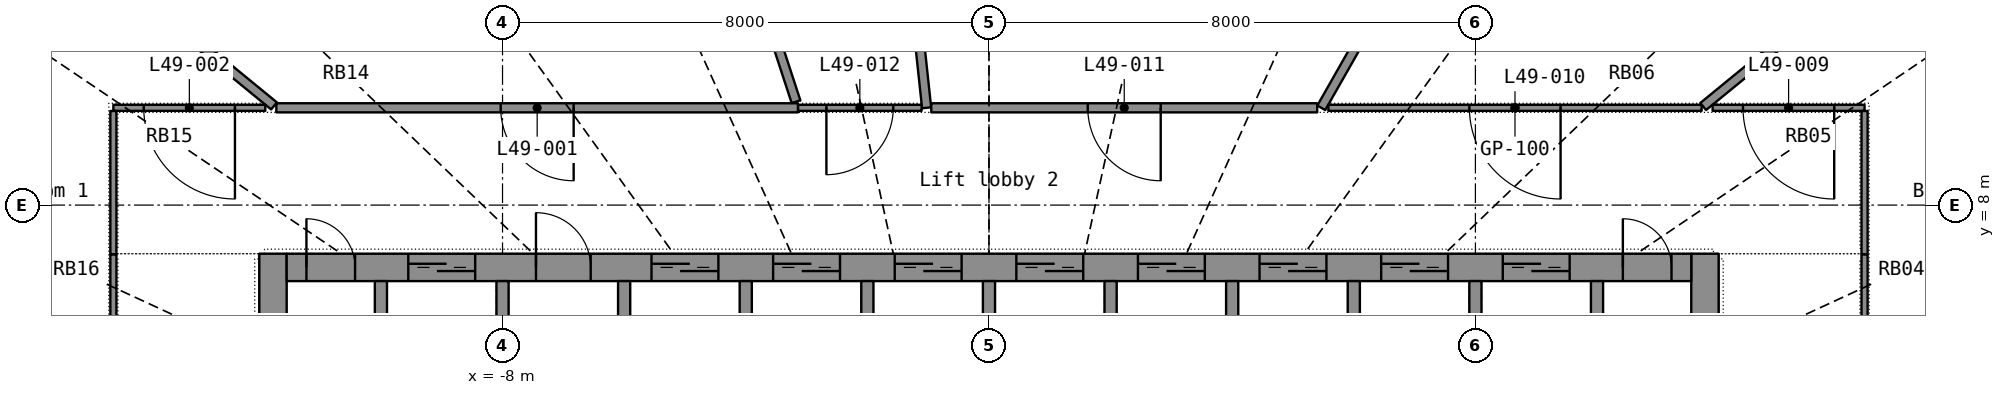
"""IFC4 building model, lengths in metres.
Left out: names, types, materials, properties, quantities, classifications, styles, units other than length and angle.
Written with IfcOpenShell. Run it as: python <this file> out.ifc"""

import sys

from ifc_helpers import new_model, si_unit, direction, frame, frame_2d, origin, place, context, subcontext, project, spatial, rectangle, extrude, element, fill, save


model = new_model("IFC4")
c1 = context("Model", 3, precision=1e-05, world=origin(), true_north=direction((0.0, 1.0)))
c2 = subcontext(c1, "Body", "Model", "MODEL_VIEW")
j1 = project(units=[si_unit("LENGTHUNIT", "METRE"), si_unit("PLANEANGLEUNIT", "RADIAN")], contexts=[c1])
p1 = place(None, origin())
s1 = spatial("IfcSite", under=j1, at=p1, CompositionType="ELEMENT")
p2 = place(p1, origin())
s2 = spatial("IfcBuilding", under=s1, at=p2, CompositionType="ELEMENT")
p3 = place(p2, frame((0.0, 0.0, 201.5)))
s3 = spatial("IfcBuildingStorey", under=s2, at=p3, CompositionType="ELEMENT", Elevation=201.5)
p4 = place(p3, frame((-11.775, -7.2, 0.0), z_axis=(0.0, 0.0, 1.0), x_axis=(0.0, 1.0, 0.0)))
e1 = element("IfcWall", 1, at=p4, inside=s3, PredefinedType="SHEAR", context=c2, shape_type="SweptSolid", body=[
    extrude(rectangle(XDim=14.4, YDim=0.45, at=frame_2d((7.2, 0.0))), origin(), (0.0, 0.0, 1.0), 3.3),
])
p5 = place(p4, frame((6.5, 0.0, 0.0)))
e2 = element("IfcOpeningElement", 2, at=p5, cuts=e1, PredefinedType="OPENING", context=c2, shape_type="SweptSolid", body=[
    extrude(rectangle(XDim=1.4, YDim=2.2, at=frame_2d((0.7, 1.1))), frame((0.0, 0.235, 0.0), z_axis=(0.0, -1.0, 0.0), x_axis=(1.0, 0.0, 0.0)), (0.0, 0.0, 1.0), 0.47),
])
p6 = place(p3, frame((11.775, -7.2, 0.0), z_axis=(0.0, 0.0, 1.0), x_axis=(0.0, 1.0, 0.0)))
e3 = element("IfcWall", 3, at=p6, inside=s3, PredefinedType="SHEAR", context=c2, shape_type="SweptSolid", body=[
    extrude(rectangle(XDim=14.4, YDim=0.45, at=frame_2d((7.2, 0.0))), origin(), (0.0, 0.0, 1.0), 3.3),
])
p7 = place(p6, frame((6.5, 0.0, 0.0)))
e4 = element("IfcOpeningElement", 4, at=p7, cuts=e3, PredefinedType="OPENING", context=c2, shape_type="SweptSolid", body=[
    extrude(rectangle(XDim=1.4, YDim=2.2, at=frame_2d((0.7, 1.1))), frame((0.0, 0.235, 0.0), z_axis=(0.0, -1.0, 0.0), x_axis=(1.0, 0.0, 0.0)), (0.0, 0.0, 1.0), 0.47),
])
p8 = place(p3, frame((-11.55, 6.975, 0.0), z_axis=(0.0, 0.0, 1.0), x_axis=(1.0, 0.0, 0.0)))
e5 = element("IfcWall", 5, at=p8, inside=s3, PredefinedType="SHEAR", context=c2, shape_type="SweptSolid", body=[
    extrude(rectangle(XDim=23.1, YDim=0.45, at=frame_2d((11.55, 0.0))), origin(), (0.0, 0.0, 1.0), 3.3),
])
p9 = place(p8, frame((2.0, 0.0, 0.0)))
e6 = element("IfcOpeningElement", 6, at=p9, cuts=e5, PredefinedType="OPENING", context=c2, shape_type="SweptSolid", body=[
    extrude(rectangle(XDim=1.1, YDim=2.2, at=frame_2d((0.55, 1.1))), frame((0.0, 0.235, 0.0), z_axis=(0.0, -1.0, 0.0), x_axis=(1.0, 0.0, 0.0)), (0.0, 0.0, 1.0), 0.47),
])
p10 = place(p8, frame((6.0, 0.0, 0.0)))
e7 = element("IfcOpeningElement", 7, at=p10, cuts=e5, PredefinedType="OPENING", context=c2, shape_type="SweptSolid", body=[
    extrude(rectangle(XDim=1.1, YDim=2.2, at=frame_2d((0.55, 1.1))), frame((0.0, 0.235, 0.0), z_axis=(0.0, -1.0, 0.0), x_axis=(1.0, 0.0, 0.0)), (0.0, 0.0, 1.0), 0.47),
])
p11 = place(p8, frame((8.0, 0.0, 0.0)))
e8 = element("IfcOpeningElement", 8, at=p11, cuts=e5, PredefinedType="OPENING", context=c2, shape_type="SweptSolid", body=[
    extrude(rectangle(XDim=1.1, YDim=2.2, at=frame_2d((0.55, 1.1))), frame((0.0, 0.235, 0.0), z_axis=(0.0, -1.0, 0.0), x_axis=(1.0, 0.0, 0.0)), (0.0, 0.0, 1.0), 0.47),
])
p12 = place(p8, frame((10.0, 0.0, 0.0)))
e9 = element("IfcOpeningElement", 9, at=p12, cuts=e5, PredefinedType="OPENING", context=c2, shape_type="SweptSolid", body=[
    extrude(rectangle(XDim=1.1, YDim=2.2, at=frame_2d((0.55, 1.1))), frame((0.0, 0.235, 0.0), z_axis=(0.0, -1.0, 0.0), x_axis=(1.0, 0.0, 0.0)), (0.0, 0.0, 1.0), 0.47),
])
p13 = place(p8, frame((12.0, 0.0, 0.0)))
e10 = element("IfcOpeningElement", 10, at=p13, cuts=e5, PredefinedType="OPENING", context=c2, shape_type="SweptSolid", body=[
    extrude(rectangle(XDim=1.1, YDim=2.2, at=frame_2d((0.55, 1.1))), frame((0.0, 0.235, 0.0), z_axis=(0.0, -1.0, 0.0), x_axis=(1.0, 0.0, 0.0)), (0.0, 0.0, 1.0), 0.47),
])
p14 = place(p8, frame((14.0, 0.0, 0.0)))
e11 = element("IfcOpeningElement", 11, at=p14, cuts=e5, PredefinedType="OPENING", context=c2, shape_type="SweptSolid", body=[
    extrude(rectangle(XDim=1.1, YDim=2.2, at=frame_2d((0.55, 1.1))), frame((0.0, 0.235, 0.0), z_axis=(0.0, -1.0, 0.0), x_axis=(1.0, 0.0, 0.0)), (0.0, 0.0, 1.0), 0.47),
])
p15 = place(p8, frame((16.0, 0.0, 0.0)))
e12 = element("IfcOpeningElement", 12, at=p15, cuts=e5, PredefinedType="OPENING", context=c2, shape_type="SweptSolid", body=[
    extrude(rectangle(XDim=1.1, YDim=2.2, at=frame_2d((0.55, 1.1))), frame((0.0, 0.235, 0.0), z_axis=(0.0, -1.0, 0.0), x_axis=(1.0, 0.0, 0.0)), (0.0, 0.0, 1.0), 0.47),
])
p16 = place(p8, frame((18.0, 0.0, 0.0)))
e13 = element("IfcOpeningElement", 13, at=p16, cuts=e5, PredefinedType="OPENING", context=c2, shape_type="SweptSolid", body=[
    extrude(rectangle(XDim=1.1, YDim=2.2, at=frame_2d((0.55, 1.1))), frame((0.0, 0.235, 0.0), z_axis=(0.0, -1.0, 0.0), x_axis=(1.0, 0.0, 0.0)), (0.0, 0.0, 1.0), 0.47),
])
p17 = place(p8, frame((20.0, 0.0, 0.0)))
e14 = element("IfcOpeningElement", 14, at=p17, cuts=e5, PredefinedType="OPENING", context=c2, shape_type="SweptSolid", body=[
    extrude(rectangle(XDim=1.1, YDim=2.2, at=frame_2d((0.55, 1.1))), frame((0.0, 0.235, 0.0), z_axis=(0.0, -1.0, 0.0), x_axis=(1.0, 0.0, 0.0)), (0.0, 0.0, 1.0), 0.47),
])
p18 = place(p8, frame((4.1, 0.0, 0.0)))
e15 = element("IfcOpeningElement", 15, at=p18, cuts=e5, PredefinedType="OPENING", context=c2, shape_type="SweptSolid", body=[
    extrude(rectangle(XDim=0.9, YDim=2.1, at=frame_2d((0.45, 1.05))), frame((0.0, 0.235, 0.0), z_axis=(0.0, -1.0, 0.0), x_axis=(1.0, 0.0, 0.0)), (0.0, 0.0, 1.0), 0.47),
])
p19 = place(p8, frame((0.325, 0.0, 0.0)))
e16 = element("IfcOpeningElement", 16, at=p19, cuts=e5, PredefinedType="OPENING", context=c2, shape_type="SweptSolid", body=[
    extrude(rectangle(XDim=0.8, YDim=2.05, at=frame_2d((0.4, 1.025))), frame((0.0, 0.235, 0.0), z_axis=(0.0, -1.0, 0.0), x_axis=(1.0, 0.0, 0.0)), (0.0, 0.0, 1.0), 0.47),
])
p20 = place(p8, frame((21.975, 0.0, 0.0)))
e17 = element("IfcOpeningElement", 17, at=p20, cuts=e5, PredefinedType="OPENING", context=c2, shape_type="SweptSolid", body=[
    extrude(rectangle(XDim=0.8, YDim=2.05, at=frame_2d((0.4, 1.025))), frame((0.0, 0.235, 0.0), z_axis=(0.0, -1.0, 0.0), x_axis=(1.0, 0.0, 0.0)), (0.0, 0.0, 1.0), 0.47),
])
for number, where, z_axis, x_axis in (
    (18, (-10.0, 3.9, 0.0), (0.0, 0.0, 1.0), (0.0, 1.0, 0.0)),
    (19, (-8.0, 3.9, 0.0), (0.0, 0.0, 1.0), (0.0, 1.0, 0.0)),
    (20, (-6.0, 3.9, 0.0), (0.0, 0.0, 1.0), (0.0, 1.0, 0.0)),
    (21, (-4.0, 3.9, 0.0), (0.0, 0.0, 1.0), (0.0, 1.0, 0.0)),
    (22, (-2.0, 3.9, 0.0), (0.0, 0.0, 1.0), (0.0, 1.0, 0.0)),
    (23, (0.0, 3.9, 0.0), (0.0, 0.0, 1.0), (0.0, 1.0, 0.0)),
    (24, (2.0, 3.9, 0.0), (0.0, 0.0, 1.0), (0.0, 1.0, 0.0)),
    (25, (4.0, 3.9, 0.0), (0.0, 0.0, 1.0), (0.0, 1.0, 0.0)),
    (26, (6.0, 3.9, 0.0), (0.0, 0.0, 1.0), (0.0, 1.0, 0.0)),
    (27, (8.0, 3.9, 0.0), (0.0, 0.0, 1.0), (0.0, 1.0, 0.0)),
    (28, (10.0, 3.9, 0.0), (0.0, 0.0, 1.0), (0.0, 1.0, 0.0)),
):
    element("IfcWall", number, at=place(p3, frame(where, z_axis=z_axis, x_axis=x_axis)), inside=s3, PredefinedType="SHEAR", context=c2, shape_type="SweptSolid", body=[
        extrude(rectangle(XDim=2.85, YDim=0.2, at=frame_2d((1.425, 0.0))), origin(), (0.0, 0.0, 1.0), 3.3),
    ])
p21 = place(p3, frame((-1.938, 18.14, 0.0), z_axis=(0.0, 0.0, 1.0), x_axis=(0.106205895, -0.99434416, 0.0)))
e29 = element("IfcWall", 29, at=p21, inside=s3, PredefinedType="PARTITIONING", context=c2, shape_type="SweptSolid", body=[
    extrude(rectangle(XDim=8.588, YDim=0.15, at=frame_2d((4.294, 0.0))), origin(), (0.0, 0.0, 1.0), 2.4),
])
p22 = place(p3, frame((-3.14, 9.6, 0.0), z_axis=(0.0, 0.0, 1.0), x_axis=(-1.0, 0.0, 0.0)))
e30 = element("IfcWall", 30, at=p22, inside=s3, PredefinedType="PARTITIONING", context=c2, shape_type="SweptSolid", body=[
    extrude(rectangle(XDim=8.58, YDim=0.15, at=frame_2d((4.29, 0.0))), origin(), (0.0, 0.0, 1.0), 2.4),
])
p23 = place(p22, frame((3.69, 0.0, 0.0)))
e31 = element("IfcOpeningElement", 31, at=p23, cuts=e30, PredefinedType="OPENING", context=c2, shape_type="SweptSolid", body=[
    extrude(rectangle(XDim=1.2, YDim=2.2, at=frame_2d((0.6, 1.1))), frame((0.0, 0.085, 0.0), z_axis=(0.0, -1.0, 0.0), x_axis=(1.0, 0.0, 0.0)), (0.0, 0.0, 1.0), 0.17),
])
p24 = place(p3, frame((-3.173, 9.7, 0.0), z_axis=(0.0, 0.0, 1.0), x_axis=(-0.31092844, 0.950433325, 0.0)))
e32 = element("IfcWall", 32, at=p24, inside=s3, PredefinedType="PARTITIONING", context=c2, shape_type="SweptSolid", body=[
    extrude(rectangle(XDim=8.3, YDim=0.15, at=frame_2d((4.15, 0.0))), origin(), (0.0, 0.0, 1.0), 2.4),
])
p25 = place(p3, frame((9.396, 16.505, 0.0), z_axis=(0.0, 0.0, 1.0), x_axis=(-0.494718736, -0.869053147, 0.0)))
e33 = element("IfcWall", 33, at=p25, inside=s3, PredefinedType="PARTITIONING", context=c2, shape_type="SweptSolid", body=[
    extrude(rectangle(XDim=7.946, YDim=0.15, at=frame_2d((3.973, 0.0))), origin(), (0.0, 0.0, 1.0), 2.4),
])
p26 = place(p3, frame((5.398, 9.6, 0.0), z_axis=(0.0, 0.0, 1.0), x_axis=(-1.0, 0.0, 0.0)))
e34 = element("IfcWall", 34, at=p26, inside=s3, PredefinedType="PARTITIONING", context=c2, shape_type="SweptSolid", body=[
    extrude(rectangle(XDim=6.347, YDim=0.15, at=frame_2d((3.173, 0.0))), origin(), (0.0, 0.0, 1.0), 2.4),
])
p27 = place(p26, frame((2.573, 0.0, 0.0)))
e35 = element("IfcOpeningElement", 35, at=p27, cuts=e34, PredefinedType="OPENING", context=c2, shape_type="SweptSolid", body=[
    extrude(rectangle(XDim=1.2, YDim=2.2, at=frame_2d((0.6, 1.1))), frame((0.0, 0.085, 0.0), z_axis=(0.0, -1.0, 0.0), x_axis=(1.0, 0.0, 0.0)), (0.0, 0.0, 1.0), 0.17),
])
p28 = place(p3, frame((11.72, 9.6, 0.0), z_axis=(0.0, 0.0, 1.0), x_axis=(-1.0, 0.0, 0.0)))
e36 = element("IfcWall", 36, at=p28, inside=s3, PredefinedType="PARTITIONING", context=c2, shape_type="SweptSolid", body=[
    extrude(rectangle(XDim=6.138, YDim=0.1, at=frame_2d((3.069, 0.0))), origin(), (0.0, 0.0, 1.0), 2.4),
])
p29 = place(p28, frame((2.319, 0.0, 0.0)))
e37 = element("IfcOpeningElement", 37, at=p29, cuts=e36, PredefinedType="OPENING", context=c2, shape_type="SweptSolid", body=[
    extrude(rectangle(XDim=1.5, YDim=2.4, at=frame_2d((0.75, 1.2))), frame((0.0, 0.06, 0.0), z_axis=(0.0, -1.0, 0.0), x_axis=(1.0, 0.0, 0.0)), (0.0, 0.0, 1.0), 0.12),
])
p30 = place(p3, frame((-20.167, 7.703, 0.0), z_axis=(0.0, 0.0, 1.0), x_axis=(0.934182919, -0.356794441, 0.0)))
e38 = element("IfcWall", 38, at=p30, inside=s3, PredefinedType="PARTITIONING", context=c2, shape_type="SweptSolid", body=[
    extrude(rectangle(XDim=6.173, YDim=0.15, at=frame_2d((3.087, 0.0))), origin(), (0.0, 0.0, 1.0), 2.4),
])
p31 = place(p3, frame((19.367, 7.397, 0.0), z_axis=(0.0, 0.0, 1.0), x_axis=(-0.934183326, -0.356793376, 0.0)))
e39 = element("IfcWall", 39, at=p31, inside=s3, PredefinedType="PARTITIONING", context=c2, shape_type="SweptSolid", body=[
    extrude(rectangle(XDim=5.317, YDim=0.15, at=frame_2d((2.658, 0.0))), origin(), (0.0, 0.0, 1.0), 2.4),
])
p32 = place(p3, frame((-15.729, 12.883, 0.0), z_axis=(0.0, 0.0, 1.0), x_axis=(0.77361382, -0.633657366, 0.0)))
e40 = element("IfcWall", 40, at=p32, inside=s3, PredefinedType="PARTITIONING", context=c2, shape_type="SweptSolid", body=[
    extrude(rectangle(XDim=5.132, YDim=0.15, at=frame_2d((2.566, 0.0))), origin(), (0.0, 0.0, 1.0), 2.4),
])
p33 = place(p3, frame((15.727, 12.882, 0.0), z_axis=(0.0, 0.0, 1.0), x_axis=(-0.773595696, -0.633679492, 0.0)))
e41 = element("IfcWall", 41, at=p33, inside=s3, PredefinedType="PARTITIONING", context=c2, shape_type="SweptSolid", body=[
    extrude(rectangle(XDim=5.146, YDim=0.15, at=frame_2d((2.573, 0.0))), origin(), (0.0, 0.0, 1.0), 2.4),
])
p34 = place(p3, frame((-11.901, 9.6, 0.0), z_axis=(0.0, 0.0, 1.0), x_axis=(-1.0, 0.0, 0.0)))
e42 = element("IfcWall", 42, at=p34, inside=s3, PredefinedType="PARTITIONING", context=c2, shape_type="SweptSolid", body=[
    extrude(rectangle(XDim=2.499, YDim=0.1, at=frame_2d((1.249, 0.0))), origin(), (0.0, 0.0, 1.0), 2.4),
])
p35 = place(p34, frame((0.499, 0.0, 0.0)))
e43 = element("IfcOpeningElement", 43, at=p35, cuts=e42, PredefinedType="OPENING", context=c2, shape_type="SweptSolid", body=[
    extrude(rectangle(XDim=1.5, YDim=2.4, at=frame_2d((0.75, 1.2))), frame((0.0, 0.06, 0.0), z_axis=(0.0, -1.0, 0.0), x_axis=(1.0, 0.0, 0.0)), (0.0, 0.0, 1.0), 0.12),
])
p36 = place(p3, frame((14.4, 9.6, 0.0), z_axis=(0.0, 0.0, 1.0), x_axis=(-1.0, 0.0, 0.0)))
e44 = element("IfcWall", 44, at=p36, inside=s3, PredefinedType="PARTITIONING", context=c2, shape_type="SweptSolid", body=[
    extrude(rectangle(XDim=2.499, YDim=0.1, at=frame_2d((1.249, 0.0))), origin(), (0.0, 0.0, 1.0), 2.4),
])
p37 = place(p36, frame((0.499, 0.0, 0.0)))
e45 = element("IfcOpeningElement", 45, at=p37, cuts=e44, PredefinedType="OPENING", context=c2, shape_type="SweptSolid", body=[
    extrude(rectangle(XDim=1.5, YDim=2.4, at=frame_2d((0.75, 1.2))), frame((0.0, 0.06, 0.0), z_axis=(0.0, -1.0, 0.0), x_axis=(1.0, 0.0, 0.0)), (0.0, 0.0, 1.0), 0.12),
])
for number, where, z_axis, x_axis in (
    (46, (-14.4, 9.548, 0.0), (0.0, 0.0, 1.0), (0.0, -1.0, 0.0)),
    (47, (14.4, 7.188, 0.0), (0.0, 0.0, 1.0), (0.0, 1.0, 0.0)),
):
    element("IfcWall", number, at=place(p3, frame(where, z_axis=z_axis, x_axis=x_axis)), inside=s3, PredefinedType="PARTITIONING", context=c2, shape_type="SweptSolid", body=[
        extrude(rectangle(XDim=2.36, YDim=0.1, at=frame_2d((1.18, 0.0))), origin(), (0.0, 0.0, 1.0), 2.4),
    ])
p38 = place(p3, frame((-1.108, 9.6, 0.0), z_axis=(0.0, 0.0, 1.0), x_axis=(-1.0, 0.0, 0.0)))
e48 = element("IfcWall", 48, at=p38, inside=s3, PredefinedType="PARTITIONING", context=c2, shape_type="SweptSolid", body=[
    extrude(rectangle(XDim=2.031, YDim=0.1, at=frame_2d((1.016, 0.0))), origin(), (0.0, 0.0, 1.0), 2.4),
])
p39 = place(p38, frame((0.466, 0.0, 0.0)))
e49 = element("IfcOpeningElement", 49, at=p39, cuts=e48, PredefinedType="OPENING", context=c2, shape_type="SweptSolid", body=[
    extrude(rectangle(XDim=1.1, YDim=2.2, at=frame_2d((0.55, 1.1))), frame((0.0, 0.06, 0.0), z_axis=(0.0, -1.0, 0.0), x_axis=(1.0, 0.0, 0.0)), (0.0, 0.0, 1.0), 0.12),
])
for number, where, z_axis, x_axis in (
    (50, (-14.4, 7.187, 0.0), (0.0, 0.0, 1.0), (0.0, -1.0, 0.0)),
    (51, (14.4, 5.602, 0.0), (0.0, 0.0, 1.0), (0.0, 1.0, 0.0)),
):
    element("IfcWall", number, at=place(p3, frame(where, z_axis=z_axis, x_axis=x_axis)), inside=s3, PredefinedType="PARTITIONING", context=c2, shape_type="SweptSolid", body=[
        extrude(rectangle(XDim=1.585, YDim=0.1, at=frame_2d((0.793, 0.0))), origin(), (0.0, 0.0, 1.0), 2.4),
    ])
p40 = place(p9, origin())
e52 = element("IfcDoor", 52, at=p40, inside=s3, OperationType="DOUBLE_DOOR_SLIDING", PredefinedType="DOOR", context=c2, shape_type="SweptSolid", body=[
    extrude(rectangle(XDim=1.1, YDim=2.2, at=frame_2d((0.55, 1.1))), frame((0.0, 0.025, 0.0), z_axis=(0.0, -1.0, 0.0), x_axis=(1.0, 0.0, 0.0)), (0.0, 0.0, 1.0), 0.05),
])
fill(e6, e52)
p41 = place(p10, origin())
e53 = element("IfcDoor", 53, at=p41, inside=s3, OperationType="DOUBLE_DOOR_SLIDING", PredefinedType="DOOR", context=c2, shape_type="SweptSolid", body=[
    extrude(rectangle(XDim=1.1, YDim=2.2, at=frame_2d((0.55, 1.1))), frame((0.0, 0.025, 0.0), z_axis=(0.0, -1.0, 0.0), x_axis=(1.0, 0.0, 0.0)), (0.0, 0.0, 1.0), 0.05),
])
fill(e7, e53)
p42 = place(p11, origin())
e54 = element("IfcDoor", 54, at=p42, inside=s3, OperationType="DOUBLE_DOOR_SLIDING", PredefinedType="DOOR", context=c2, shape_type="SweptSolid", body=[
    extrude(rectangle(XDim=1.1, YDim=2.2, at=frame_2d((0.55, 1.1))), frame((0.0, 0.025, 0.0), z_axis=(0.0, -1.0, 0.0), x_axis=(1.0, 0.0, 0.0)), (0.0, 0.0, 1.0), 0.05),
])
fill(e8, e54)
p43 = place(p12, origin())
e55 = element("IfcDoor", 55, at=p43, inside=s3, OperationType="DOUBLE_DOOR_SLIDING", PredefinedType="DOOR", context=c2, shape_type="SweptSolid", body=[
    extrude(rectangle(XDim=1.1, YDim=2.2, at=frame_2d((0.55, 1.1))), frame((0.0, 0.025, 0.0), z_axis=(0.0, -1.0, 0.0), x_axis=(1.0, 0.0, 0.0)), (0.0, 0.0, 1.0), 0.05),
])
fill(e9, e55)
p44 = place(p13, origin())
e56 = element("IfcDoor", 56, at=p44, inside=s3, OperationType="DOUBLE_DOOR_SLIDING", PredefinedType="DOOR", context=c2, shape_type="SweptSolid", body=[
    extrude(rectangle(XDim=1.1, YDim=2.2, at=frame_2d((0.55, 1.1))), frame((0.0, 0.025, 0.0), z_axis=(0.0, -1.0, 0.0), x_axis=(1.0, 0.0, 0.0)), (0.0, 0.0, 1.0), 0.05),
])
fill(e10, e56)
p45 = place(p14, origin())
e57 = element("IfcDoor", 57, at=p45, inside=s3, OperationType="DOUBLE_DOOR_SLIDING", PredefinedType="DOOR", context=c2, shape_type="SweptSolid", body=[
    extrude(rectangle(XDim=1.1, YDim=2.2, at=frame_2d((0.55, 1.1))), frame((0.0, 0.025, 0.0), z_axis=(0.0, -1.0, 0.0), x_axis=(1.0, 0.0, 0.0)), (0.0, 0.0, 1.0), 0.05),
])
fill(e11, e57)
p46 = place(p15, origin())
e58 = element("IfcDoor", 58, at=p46, inside=s3, OperationType="DOUBLE_DOOR_SLIDING", PredefinedType="DOOR", context=c2, shape_type="SweptSolid", body=[
    extrude(rectangle(XDim=1.1, YDim=2.2, at=frame_2d((0.55, 1.1))), frame((0.0, 0.025, 0.0), z_axis=(0.0, -1.0, 0.0), x_axis=(1.0, 0.0, 0.0)), (0.0, 0.0, 1.0), 0.05),
])
fill(e12, e58)
p47 = place(p16, origin())
e59 = element("IfcDoor", 59, at=p47, inside=s3, OperationType="DOUBLE_DOOR_SLIDING", PredefinedType="DOOR", context=c2, shape_type="SweptSolid", body=[
    extrude(rectangle(XDim=1.1, YDim=2.2, at=frame_2d((0.55, 1.1))), frame((0.0, 0.025, 0.0), z_axis=(0.0, -1.0, 0.0), x_axis=(1.0, 0.0, 0.0)), (0.0, 0.0, 1.0), 0.05),
])
fill(e13, e59)
p48 = place(p17, origin())
e60 = element("IfcDoor", 60, at=p48, inside=s3, OperationType="DOUBLE_DOOR_SLIDING", PredefinedType="DOOR", context=c2, shape_type="SweptSolid", body=[
    extrude(rectangle(XDim=1.1, YDim=2.2, at=frame_2d((0.55, 1.1))), frame((0.0, 0.025, 0.0), z_axis=(0.0, -1.0, 0.0), x_axis=(1.0, 0.0, 0.0)), (0.0, 0.0, 1.0), 0.05),
])
fill(e14, e60)
p49 = place(p18, origin())
e61 = element("IfcDoor", 61, at=p49, inside=s3, OperationType="SINGLE_SWING_LEFT", PredefinedType="DOOR", context=c2, shape_type="SweptSolid", body=[
    extrude(rectangle(XDim=0.9, YDim=2.1, at=frame_2d((0.45, 1.05))), frame((0.0, 0.025, 0.0), z_axis=(0.0, -1.0, 0.0), x_axis=(1.0, 0.0, 0.0)), (0.0, 0.0, 1.0), 0.05),
])
fill(e15, e61)
p50 = place(p19, origin())
e62 = element("IfcDoor", 62, at=p50, inside=s3, OperationType="SINGLE_SWING_LEFT", PredefinedType="DOOR", context=c2, shape_type="SweptSolid", body=[
    extrude(rectangle(XDim=0.8, YDim=2.05, at=frame_2d((0.4, 1.025))), frame((0.0, 0.025, 0.0), z_axis=(0.0, -1.0, 0.0), x_axis=(1.0, 0.0, 0.0)), (0.0, 0.0, 1.0), 0.05),
])
fill(e16, e62)
p51 = place(p20, origin())
e63 = element("IfcDoor", 63, at=p51, inside=s3, OperationType="SINGLE_SWING_LEFT", PredefinedType="DOOR", context=c2, shape_type="SweptSolid", body=[
    extrude(rectangle(XDim=0.8, YDim=2.05, at=frame_2d((0.4, 1.025))), frame((0.0, 0.025, 0.0), z_axis=(0.0, -1.0, 0.0), x_axis=(1.0, 0.0, 0.0)), (0.0, 0.0, 1.0), 0.05),
])
fill(e17, e63)
p52 = place(p23, origin())
e64 = element("IfcDoor", 64, at=p52, inside=s3, OperationType="DOUBLE_DOOR_SINGLE_SWING", PredefinedType="DOOR", context=c2, shape_type="SweptSolid", body=[
    extrude(rectangle(XDim=1.2, YDim=2.2, at=frame_2d((0.6, 1.1))), frame((0.0, 0.025, 0.0), z_axis=(0.0, -1.0, 0.0), x_axis=(1.0, 0.0, 0.0)), (0.0, 0.0, 1.0), 0.05),
])
fill(e31, e64)
p53 = place(p35, origin())
e65 = element("IfcDoor", 65, at=p53, inside=s3, OperationType="DOUBLE_DOOR_SINGLE_SWING", PredefinedType="DOOR", context=c2, shape_type="SweptSolid", body=[
    extrude(rectangle(XDim=1.5, YDim=2.4, at=frame_2d((0.75, 1.2))), frame((0.0, 0.025, 0.0), z_axis=(0.0, -1.0, 0.0), x_axis=(1.0, 0.0, 0.0)), (0.0, 0.0, 1.0), 0.05),
])
fill(e43, e65)
p54 = place(p37, origin())
e66 = element("IfcDoor", 66, at=p54, inside=s3, OperationType="DOUBLE_DOOR_SINGLE_SWING", PredefinedType="DOOR", context=c2, shape_type="SweptSolid", body=[
    extrude(rectangle(XDim=1.5, YDim=2.4, at=frame_2d((0.75, 1.2))), frame((0.0, 0.025, 0.0), z_axis=(0.0, -1.0, 0.0), x_axis=(1.0, 0.0, 0.0)), (0.0, 0.0, 1.0), 0.05),
])
fill(e45, e66)
p55 = place(p29, origin())
e67 = element("IfcDoor", 67, at=p55, inside=s3, OperationType="DOUBLE_DOOR_SINGLE_SWING", PredefinedType="DOOR", context=c2, shape_type="SweptSolid", body=[
    extrude(rectangle(XDim=1.5, YDim=2.4, at=frame_2d((0.75, 1.2))), frame((0.0, 0.025, 0.0), z_axis=(0.0, -1.0, 0.0), x_axis=(1.0, 0.0, 0.0)), (0.0, 0.0, 1.0), 0.05),
])
fill(e37, e67)
p56 = place(p27, origin())
e68 = element("IfcDoor", 68, at=p56, inside=s3, OperationType="DOUBLE_DOOR_SINGLE_SWING", PredefinedType="DOOR", context=c2, shape_type="SweptSolid", body=[
    extrude(rectangle(XDim=1.2, YDim=2.2, at=frame_2d((0.6, 1.1))), frame((0.0, 0.025, 0.0), z_axis=(0.0, -1.0, 0.0), x_axis=(1.0, 0.0, 0.0)), (0.0, 0.0, 1.0), 0.05),
])
fill(e35, e68)
p57 = place(p39, origin())
e69 = element("IfcDoor", 69, at=p57, inside=s3, OperationType="SINGLE_SWING_RIGHT", PredefinedType="DOOR", context=c2, shape_type="SweptSolid", body=[
    extrude(rectangle(XDim=1.1, YDim=2.2, at=frame_2d((0.55, 1.1))), frame((0.0, 0.025, 0.0), z_axis=(0.0, -1.0, 0.0), x_axis=(1.0, 0.0, 0.0)), (0.0, 0.0, 1.0), 0.05),
])
fill(e49, e69)
save(model, sys.argv[1])
